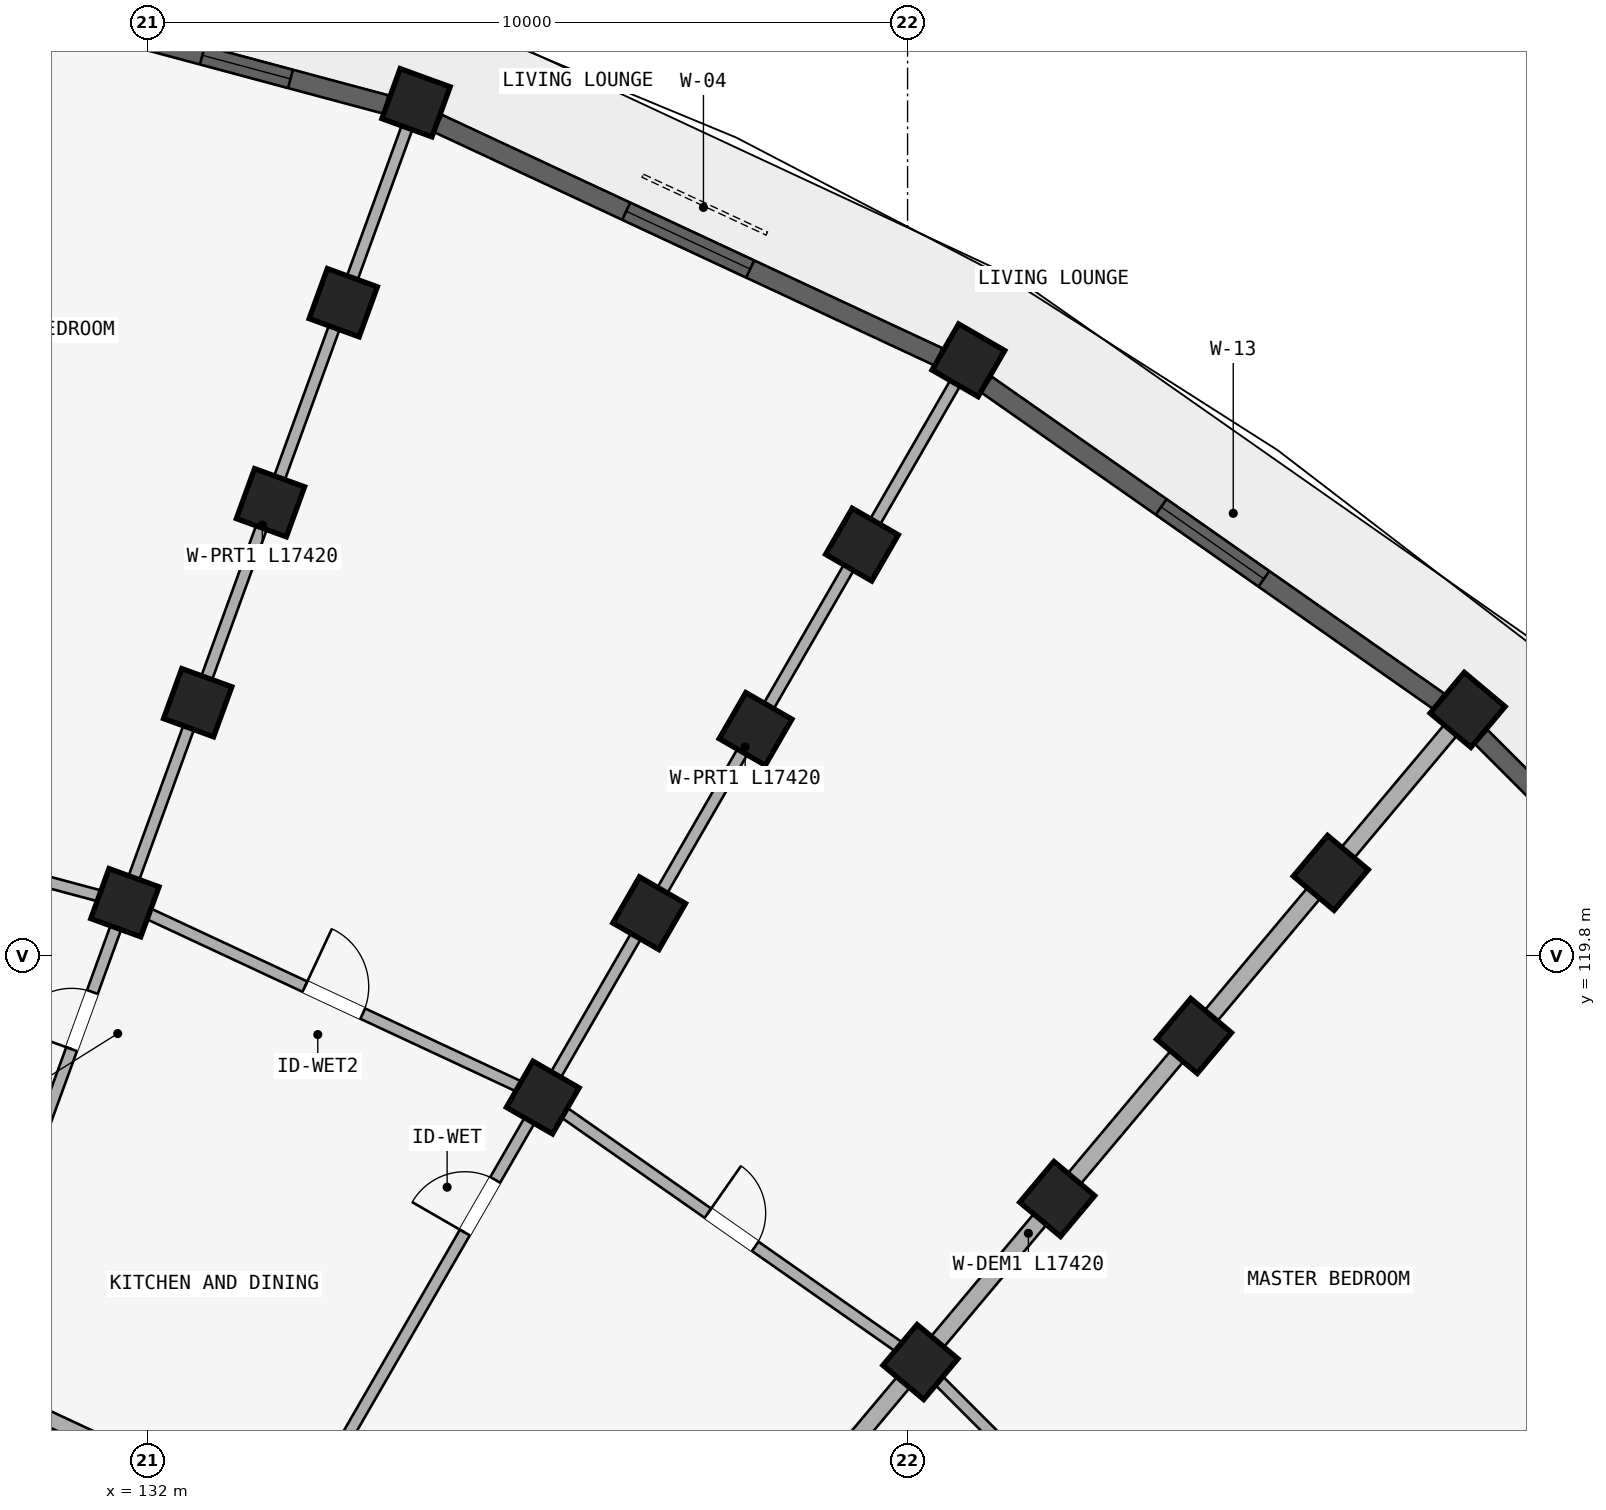
"""IFC4 building model, lengths in metres.
Left out: names, types, materials, properties, quantities, classifications, styles, units other than length and angle.
Written with IfcOpenShell. Run it as: python <this file> out.ifc"""

import sys

from ifc_helpers import new_model, si_unit, direction, frame, frame_2d, origin, origin_2d, place, context, subcontext, project, spatial, rectangle, extrude, element, fill, save


model = new_model("IFC4")
c1 = context("Model", 3, precision=1e-05, world=origin(), true_north=direction((0.0, 1.0)))
c2 = subcontext(c1, "Body", "Model", "MODEL_VIEW")
j1 = project(units=[si_unit("LENGTHUNIT", "METRE"), si_unit("PLANEANGLEUNIT", "RADIAN")], contexts=[c1])
p1 = place(None, origin())
s1 = spatial("IfcSite", under=j1, at=p1, CompositionType="ELEMENT")
p2 = place(p1, origin())
s2 = spatial("IfcBuilding", under=s1, at=p2, CompositionType="ELEMENT")
p3 = place(p2, frame((0.0, 0.0, 18.15)))
s3 = spatial("IfcBuildingStorey", under=s2, at=p3, CompositionType="ELEMENT", Elevation=18.15)
for number, where, z_axis, x_axis in (
    (1, (131.702, 120.501, 0.0), (0.0, 0.0, 1.0), (-0.94, 0.342, 0.0)),
    (2, (132.66, 123.132, 0.0), (0.0, 0.0, 1.0), (-0.94, 0.342, 0.0)),
    (3, (133.618, 125.764, 0.0), (0.0, 0.0, 1.0), (-0.94, 0.342, 0.0)),
    (4, (134.575, 128.395, 0.0), (0.0, 0.0, 1.0), (-0.94, 0.342, 0.0)),
    (5, (135.533, 131.026, 0.0), (0.0, 0.0, 1.0), (-0.94, 0.342, 0.0)),
    (6, (137.2, 117.938, 0.0), (0.0, 0.0, 1.0), (-0.866, 0.5, 0.0)),
    (7, (138.6, 120.363, 0.0), (0.0, 0.0, 1.0), (-0.866, 0.5, 0.0)),
    (8, (140.0, 122.787, 0.0), (0.0, 0.0, 1.0), (-0.866, 0.5, 0.0)),
    (9, (141.4, 125.212, 0.0), (0.0, 0.0, 1.0), (-0.866, 0.5, 0.0)),
    (10, (142.8, 127.637, 0.0), (0.0, 0.0, 1.0), (-0.866, 0.5, 0.0)),
    (11, (142.169, 114.458, 0.0), (0.0, 0.0, 1.0), (-0.766, 0.643, 0.0)),
    (12, (143.969, 116.603, 0.0), (0.0, 0.0, 1.0), (-0.766, 0.643, 0.0)),
    (13, (145.769, 118.748, 0.0), (0.0, 0.0, 1.0), (-0.766, 0.643, 0.0)),
    (14, (147.568, 120.893, 0.0), (0.0, 0.0, 1.0), (-0.766, 0.643, 0.0)),
    (15, (149.368, 123.038, 0.0), (0.0, 0.0, 1.0), (-0.766, 0.643, 0.0)),
):
    element("IfcColumn", number, at=place(p3, frame(where, z_axis=z_axis, x_axis=x_axis)), inside=s3, PredefinedType="COLUMN", context=c2, shape_type="SweptSolid", body=[
        extrude(rectangle(XDim=0.7, YDim=0.7, at=origin_2d()), origin(), (0.0, 0.0, 1.0), 2.93),
    ])
p4 = place(p3, frame((129.445, 114.299, 0.0), z_axis=(0.0, 0.0, 1.0), x_axis=(0.906302381024, -0.422629854778, 0.0)))
e16 = element("IfcWall", 16, at=p4, inside=s3, PredefinedType="STANDARD", context=c2, shape_type="SweptSolid", body=[
    extrude(rectangle(XDim=4.915, YDim=0.2, at=frame_2d((2.458, 0.0))), origin(), (0.0, 0.0, 1.0), 2.372),
])
p5 = place(p3, frame((129.479, 114.393, 0.0), z_axis=(0.0, 0.0, 1.0), x_axis=(0.342022120477, 0.939691901159, 0.0)))
e17 = element("IfcWall", 17, at=p5, inside=s3, PredefinedType="PARTITIONING", context=c2, shape_type="SweptSolid", body=[
    extrude(rectangle(XDim=17.42, YDim=0.15, at=frame_2d((8.71, 0.0))), origin(), (0.0, 0.0, 1.0), 2.372),
])
p6 = place(p5, frame((4.45, 0.0, 0.0)))
e18 = element("IfcOpeningElement", 18, at=p6, cuts=e17, PredefinedType="OPENING", context=c2, shape_type="SweptSolid", body=[
    extrude(rectangle(XDim=0.8, YDim=2.1, at=frame_2d((0.4, 1.05))), frame((0.0, 0.085, 0.0), z_axis=(0.0, -1.0, 0.0), x_axis=(1.0, 0.0, 0.0)), (0.0, 0.0, 1.0), 0.17),
])
p7 = place(p3, frame((133.95, 112.309, 0.0), z_axis=(0.0, 0.0, 1.0), x_axis=(0.499997843263, 0.866026648973, 0.0)))
e19 = element("IfcWall", 19, at=p7, inside=s3, PredefinedType="PARTITIONING", context=c2, shape_type="SweptSolid", body=[
    extrude(rectangle(XDim=17.42, YDim=0.15, at=frame_2d((8.71, 0.0))), origin(), (0.0, 0.0, 1.0), 2.372),
])
p8 = place(p7, frame((4.45, 0.0, 0.0)))
e20 = element("IfcOpeningElement", 20, at=p8, cuts=e19, PredefinedType="OPENING", context=c2, shape_type="SweptSolid", body=[
    extrude(rectangle(XDim=0.8, YDim=2.1, at=frame_2d((0.4, 1.05))), frame((0.0, 0.085, 0.0), z_axis=(0.0, -1.0, 0.0), x_axis=(1.0, 0.0, 0.0)), (0.0, 0.0, 1.0), 0.17),
])
p9 = place(p3, frame((137.991, 109.479, 0.0), z_axis=(0.0, 0.0, 1.0), x_axis=(0.642784757967, 0.766046835987, 0.0)))
e21 = element("IfcWall", 21, at=p9, inside=s3, PredefinedType="STANDARD", context=c2, shape_type="SweptSolid", body=[
    extrude(rectangle(XDim=17.42, YDim=0.22, at=frame_2d((8.71, 0.0))), origin(), (0.0, 0.0, 1.0), 2.372),
])
p10 = place(p3, frame((141.479, 105.991, 0.0), z_axis=(0.0, 0.0, 1.0), x_axis=(0.766046835987, 0.642784757967, 0.0)))
e22 = element("IfcWall", 22, at=p10, inside=s3, PredefinedType="PARTITIONING", context=c2, shape_type="SweptSolid", body=[
    extrude(rectangle(XDim=17.42, YDim=0.15, at=frame_2d((8.71, 0.0))), origin(), (0.0, 0.0, 1.0), 2.372),
])
p11 = place(p10, frame((4.45, 0.0, 0.0)))
e23 = element("IfcOpeningElement", 23, at=p11, cuts=e22, PredefinedType="OPENING", context=c2, shape_type="SweptSolid", body=[
    extrude(rectangle(XDim=0.8, YDim=2.1, at=frame_2d((0.4, 1.05))), frame((0.0, 0.085, 0.0), z_axis=(0.0, -1.0, 0.0), x_axis=(1.0, 0.0, 0.0)), (0.0, 0.0, 1.0), 0.17),
])
p12 = place(p3, frame((125.843, 122.071, 0.0), z_axis=(0.0, 0.0, 1.0), x_axis=(0.965923618901, -0.258827283048, 0.0)))
e24 = element("IfcWall", 24, at=p12, inside=s3, PredefinedType="PLUMBINGWALL", context=c2, shape_type="SweptSolid", body=[
    extrude(rectangle(XDim=6.066, YDim=0.15, at=frame_2d((3.033, 0.0))), origin(), (0.0, 0.0, 1.0), 2.372),
])
p13 = place(p12, frame((2.633, 0.0, 0.0)))
e25 = element("IfcOpeningElement", 25, at=p13, cuts=e24, PredefinedType="OPENING", context=c2, shape_type="SweptSolid", body=[
    extrude(rectangle(XDim=0.8, YDim=2.1, at=frame_2d((0.4, 1.05))), frame((0.0, 0.085, 0.0), z_axis=(0.0, -1.0, 0.0), x_axis=(1.0, 0.0, 0.0)), (0.0, 0.0, 1.0), 0.17),
])
p14 = place(p3, frame((131.702, 120.501, 0.0), z_axis=(0.0, 0.0, 1.0), x_axis=(0.906312656069, -0.42260781991, 0.0)))
e26 = element("IfcWall", 26, at=p14, inside=s3, PredefinedType="PLUMBINGWALL", context=c2, shape_type="SweptSolid", body=[
    extrude(rectangle(XDim=6.066, YDim=0.15, at=frame_2d((3.033, 0.0))), origin(), (0.0, 0.0, 1.0), 2.372),
])
p15 = place(p14, frame((2.613, 0.0, 0.0)))
e27 = element("IfcOpeningElement", 27, at=p15, cuts=e26, PredefinedType="OPENING", context=c2, shape_type="SweptSolid", body=[
    extrude(rectangle(XDim=0.84, YDim=2.1, at=frame_2d((0.42, 1.05))), frame((0.0, 0.085, 0.0), z_axis=(0.0, -1.0, 0.0), x_axis=(1.0, 0.0, 0.0)), (0.0, 0.0, 1.0), 0.17),
])
p16 = place(p3, frame((137.2, 117.938, 0.0), z_axis=(0.0, 0.0, 1.0), x_axis=(0.81913926159, -0.573594691504, 0.0)))
e28 = element("IfcWall", 28, at=p16, inside=s3, PredefinedType="PLUMBINGWALL", context=c2, shape_type="SweptSolid", body=[
    extrude(rectangle(XDim=6.066, YDim=0.15, at=frame_2d((3.033, 0.0))), origin(), (0.0, 0.0, 1.0), 2.372),
])
p17 = place(p16, frame((2.653, 0.0, 0.0)))
e29 = element("IfcOpeningElement", 29, at=p17, cuts=e28, PredefinedType="OPENING", context=c2, shape_type="SweptSolid", body=[
    extrude(rectangle(XDim=0.76, YDim=2.05, at=frame_2d((0.38, 1.025))), frame((0.0, 0.085, 0.0), z_axis=(0.0, -1.0, 0.0), x_axis=(1.0, 0.0, 0.0)), (0.0, 0.0, 1.0), 0.17),
])
p18 = place(p3, frame((142.169, 114.458, 0.0), z_axis=(0.0, 0.0, 1.0), x_axis=(0.707106781187, -0.707106781187, 0.0)))
e30 = element("IfcWall", 30, at=p18, inside=s3, PredefinedType="PLUMBINGWALL", context=c2, shape_type="SweptSolid", body=[
    extrude(rectangle(XDim=6.066, YDim=0.15, at=frame_2d((3.033, 0.0))), origin(), (0.0, 0.0, 1.0), 2.372),
])
p19 = place(p18, frame((2.633, 0.0, 0.0)))
e31 = element("IfcOpeningElement", 31, at=p19, cuts=e30, PredefinedType="OPENING", context=c2, shape_type="SweptSolid", body=[
    extrude(rectangle(XDim=0.8, YDim=2.1, at=frame_2d((0.4, 1.05))), frame((0.0, 0.085, 0.0), z_axis=(0.0, -1.0, 0.0), x_axis=(1.0, 0.0, 0.0)), (0.0, 0.0, 1.0), 0.17),
])
p20 = place(p3, frame((128.118, 132.883, 0.0), z_axis=(0.0, 0.0, 1.0), x_axis=(0.965930355787, -0.258802140196, 0.0)))
e32 = element("IfcWall", 32, at=p20, inside=s3, PredefinedType="STANDARD", context=c2, shape_type="SweptSolid", body=[
    extrude(rectangle(XDim=7.267, YDim=0.25, at=frame_2d((3.633, 0.0))), origin(), (0.0, 0.0, 1.0), 2.372),
])
p21 = place(p20, frame((4.766, 0.0, 0.322)))
e33 = element("IfcOpeningElement", 33, at=p21, cuts=e32, PredefinedType="OPENING", context=c2, shape_type="SweptSolid", body=[
    extrude(rectangle(XDim=1.2, YDim=1.5, at=frame_2d((0.6, 0.75))), frame((0.0, 0.135, 0.0), z_axis=(0.0, -1.0, 0.0), x_axis=(1.0, 0.0, 0.0)), (0.0, 0.0, 1.0), 0.27),
])
p22 = place(p20, frame((1.913, 0.0, 0.0)))
e34 = element("IfcOpeningElement", 34, at=p22, cuts=e32, PredefinedType="OPENING", context=c2, shape_type="SweptSolid", body=[
    extrude(rectangle(XDim=1.26, YDim=2.15, at=frame_2d((0.63, 1.075))), frame((0.0, 0.135, 0.0), z_axis=(0.0, -1.0, 0.0), x_axis=(1.0, 0.0, 0.0)), (0.0, 0.0, 1.0), 0.27),
])
p23 = place(p3, frame((135.821, 130.754, 0.0), z_axis=(0.0, 0.0, 1.0), x_axis=(0.90630327107, -0.422627946127, 0.0)))
e35 = element("IfcWall", 35, at=p23, inside=s3, PredefinedType="STANDARD", context=c2, shape_type="SweptSolid", body=[
    extrude(rectangle(XDim=7.267, YDim=0.25, at=frame_2d((3.633, 0.0))), origin(), (0.0, 0.0, 1.0), 2.372),
])
p24 = place(p23, frame((2.733, 0.0, 0.522)))
e36 = element("IfcOpeningElement", 36, at=p24, cuts=e35, PredefinedType="OPENING", context=c2, shape_type="SweptSolid", body=[
    extrude(rectangle(XDim=1.8, YDim=1.65, at=frame_2d((0.9, 0.825))), frame((0.0, 0.135, 0.0), z_axis=(0.0, -1.0, 0.0), x_axis=(1.0, 0.0, 0.0)), (0.0, 0.0, 1.0), 0.27),
])
p25 = place(p3, frame((143.036, 127.319, 0.0), z_axis=(0.0, 0.0, 1.0), x_axis=(0.819159308599, -0.573566061701, 0.0)))
e37 = element("IfcWall", 37, at=p25, inside=s3, PredefinedType="STANDARD", context=c2, shape_type="SweptSolid", body=[
    extrude(rectangle(XDim=7.267, YDim=0.25, at=frame_2d((3.633, 0.0))), origin(), (0.0, 0.0, 1.0), 2.372),
])
p26 = place(p25, frame((2.808, 0.0, 0.422)))
e38 = element("IfcOpeningElement", 38, at=p26, cuts=e37, PredefinedType="OPENING", context=c2, shape_type="SweptSolid", body=[
    extrude(rectangle(XDim=1.65, YDim=1.75, at=frame_2d((0.825, 0.875))), frame((0.0, 0.135, 0.0), z_axis=(0.0, -1.0, 0.0), x_axis=(1.0, 0.0, 0.0)), (0.0, 0.0, 1.0), 0.27),
])
p27 = place(p3, frame((149.546, 122.684, 0.0), z_axis=(0.0, 0.0, 1.0), x_axis=(0.707106781187, -0.707106781187, 0.0)))
e39 = element("IfcWall", 39, at=p27, inside=s3, PredefinedType="STANDARD", context=c2, shape_type="SweptSolid", body=[
    extrude(rectangle(XDim=7.267, YDim=0.25, at=frame_2d((3.633, 0.0))), origin(), (0.0, 0.0, 1.0), 2.372),
])
p28 = place(p27, frame((4.766, 0.0, 0.522)))
e40 = element("IfcOpeningElement", 40, at=p28, cuts=e39, PredefinedType="OPENING", context=c2, shape_type="SweptSolid", body=[
    extrude(rectangle(XDim=1.2, YDim=1.5, at=frame_2d((0.6, 0.75))), frame((0.0, 0.135, 0.0), z_axis=(0.0, -1.0, 0.0), x_axis=(1.0, 0.0, 0.0)), (0.0, 0.0, 1.0), 0.27),
])
p29 = place(p27, frame((1.913, 0.0, 0.0)))
e41 = element("IfcOpeningElement", 41, at=p29, cuts=e39, PredefinedType="OPENING", context=c2, shape_type="SweptSolid", body=[
    extrude(rectangle(XDim=1.26, YDim=2.15, at=frame_2d((0.63, 1.075))), frame((0.0, 0.135, 0.0), z_axis=(0.0, -1.0, 0.0), x_axis=(1.0, 0.0, 0.0)), (0.0, 0.0, 1.0), 0.27),
])
p30 = place(p21, origin())
e42 = element("IfcWindow", 42, at=p30, inside=s3, PartitioningType="SINGLE_PANEL", PredefinedType="WINDOW", context=c2, shape_type="SweptSolid", body=[
    extrude(rectangle(XDim=1.2, YDim=1.5, at=frame_2d((0.6, 0.75))), frame((0.0, 0.03, 0.0), z_axis=(0.0, -1.0, 0.0), x_axis=(1.0, 0.0, 0.0)), (0.0, 0.0, 1.0), 0.06),
])
fill(e33, e42)
p31 = place(p24, origin())
e43 = element("IfcWindow", 43, at=p31, inside=s3, PartitioningType="DOUBLE_PANEL_VERTICAL", PredefinedType="WINDOW", context=c2, shape_type="SweptSolid", body=[
    extrude(rectangle(XDim=1.8, YDim=1.65, at=frame_2d((0.9, 0.825))), frame((0.0, 0.03, 0.0), z_axis=(0.0, -1.0, 0.0), x_axis=(1.0, 0.0, 0.0)), (0.0, 0.0, 1.0), 0.06),
])
fill(e36, e43)
p32 = place(p26, origin())
e44 = element("IfcWindow", 44, at=p32, inside=s3, PartitioningType="DOUBLE_PANEL_VERTICAL", PredefinedType="WINDOW", context=c2, shape_type="SweptSolid", body=[
    extrude(rectangle(XDim=1.65, YDim=1.75, at=frame_2d((0.825, 0.875))), frame((0.0, 0.03, 0.0), z_axis=(0.0, -1.0, 0.0), x_axis=(1.0, 0.0, 0.0)), (0.0, 0.0, 1.0), 0.06),
])
fill(e38, e44)
p33 = place(p6, origin())
e45 = element("IfcDoor", 45, at=p33, inside=s3, OperationType="SINGLE_SWING_LEFT", PredefinedType="DOOR", context=c2, shape_type="SweptSolid", body=[
    extrude(rectangle(XDim=0.8, YDim=2.1, at=frame_2d((0.4, 1.05))), frame((0.0, 0.025, 0.0), z_axis=(0.0, -1.0, 0.0), x_axis=(1.0, 0.0, 0.0)), (0.0, 0.0, 1.0), 0.05),
])
fill(e18, e45)
p34 = place(p8, frame((0.8, 0.0, 0.0), z_axis=(0.0, 0.0, 1.0), x_axis=(-1.0, 0.0, 0.0)))
e46 = element("IfcDoor", 46, at=p34, inside=s3, OperationType="SINGLE_SWING_RIGHT", PredefinedType="DOOR", context=c2, shape_type="SweptSolid", body=[
    extrude(rectangle(XDim=0.8, YDim=2.1, at=frame_2d((0.4, 1.05))), frame((0.0, 0.025, 0.0), z_axis=(0.0, -1.0, 0.0), x_axis=(1.0, 0.0, 0.0)), (0.0, 0.0, 1.0), 0.05),
])
fill(e20, e46)
p35 = place(p15, origin())
e47 = element("IfcDoor", 47, at=p35, inside=s3, OperationType="SINGLE_SWING_LEFT", PredefinedType="DOOR", context=c2, shape_type="SweptSolid", body=[
    extrude(rectangle(XDim=0.84, YDim=2.1, at=frame_2d((0.42, 1.05))), frame((0.0, 0.025, 0.0), z_axis=(0.0, -1.0, 0.0), x_axis=(1.0, 0.0, 0.0)), (0.0, 0.0, 1.0), 0.05),
])
fill(e27, e47)
p36 = place(p17, frame((0.76, 0.0, 0.0), z_axis=(0.0, 0.0, 1.0), x_axis=(-1.0, 0.0, 0.0)))
e48 = element("IfcDoor", 48, at=p36, inside=s3, OperationType="SINGLE_SWING_RIGHT", PredefinedType="DOOR", context=c2, shape_type="SweptSolid", body=[
    extrude(rectangle(XDim=0.76, YDim=2.05, at=frame_2d((0.38, 1.025))), frame((0.0, 0.025, 0.0), z_axis=(0.0, -1.0, 0.0), x_axis=(1.0, 0.0, 0.0)), (0.0, 0.0, 1.0), 0.05),
])
fill(e29, e48)
save(model, sys.argv[1])
